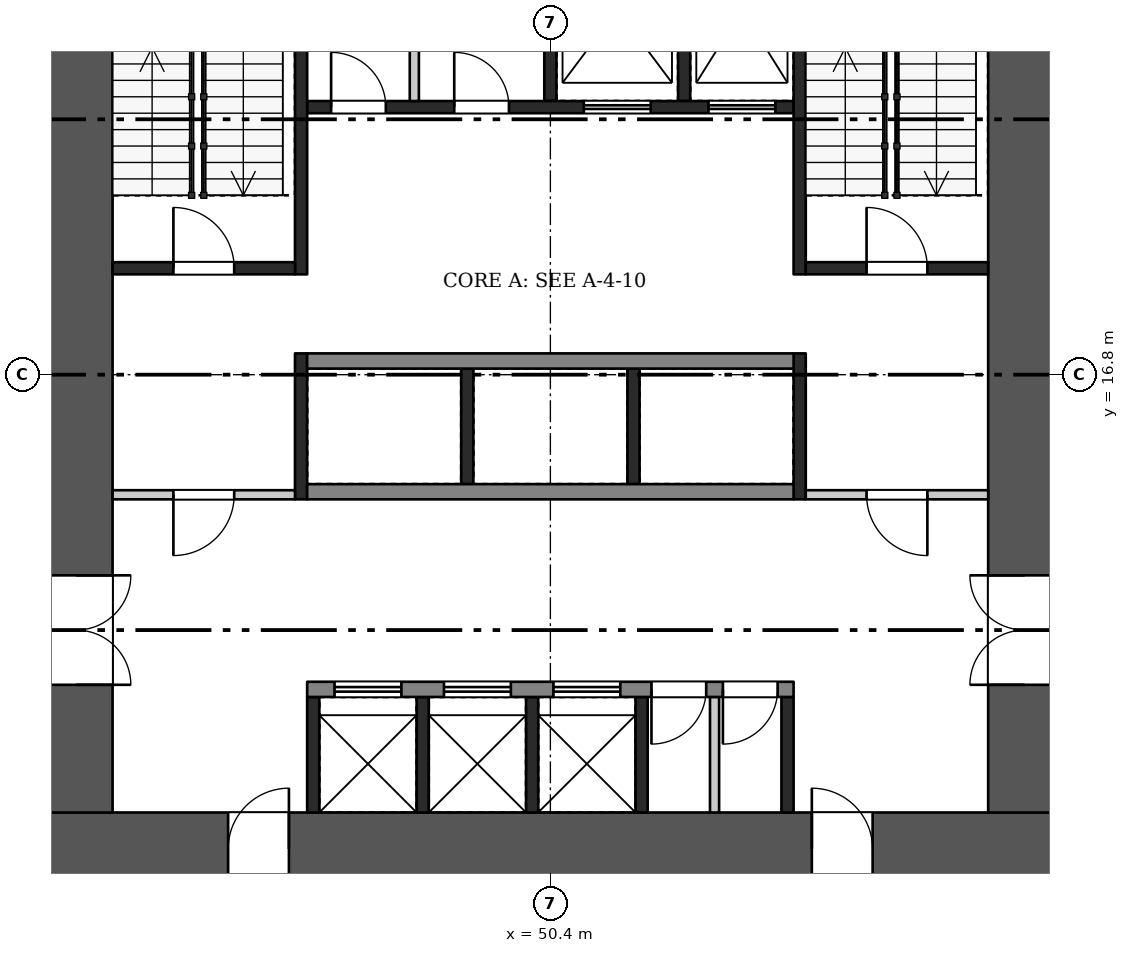
"""IFC4 building model, lengths in metres.
Left out: names, types, materials, properties, quantities, classifications, styles, units other than length and angle.
Written with IfcOpenShell. Run it as: python <this file> out.ifc"""

import sys

from ifc_helpers import new_model, si_unit, direction, frame, frame_2d, origin, place, context, subcontext, project, spatial, rectangle, extrude, element, fill, save


model = new_model("IFC4")
c1 = context("Model", 3, precision=1e-05, world=origin(), true_north=direction((0.0, 1.0)))
c2 = subcontext(c1, "Body", "Model", "MODEL_VIEW")
j1 = project(units=[si_unit("LENGTHUNIT", "METRE"), si_unit("PLANEANGLEUNIT", "RADIAN")], contexts=[c1])
p1 = place(None, origin())
s1 = spatial("IfcSite", under=j1, at=p1, CompositionType="ELEMENT")
p2 = place(p1, origin())
s2 = spatial("IfcBuilding", under=s1, at=p2, CompositionType="ELEMENT")
p3 = place(p2, frame((0.0, 0.0, 35.7)))
s3 = spatial("IfcBuildingStorey", under=s2, at=p3, CompositionType="ELEMENT", Elevation=35.7)
p4 = place(p3, frame((42.0, 9.0, 0.0), z_axis=(0.0, 0.0, 1.0), x_axis=(1.0, 0.0, 0.0)))
e1 = element("IfcWall", 1, at=p4, inside=s3, PredefinedType="SHEAR", context=c2, shape_type="SweptSolid", body=[
    extrude(rectangle(XDim=16.8, YDim=1.2, at=frame_2d((8.4, 0.0))), origin(), (0.0, 0.0, 1.0), 3.22),
])
p5 = place(p4, frame((3.1, 0.0, 0.0)))
e2 = element("IfcOpeningElement", 2, at=p5, cuts=e1, PredefinedType="OPENING", context=c2, shape_type="SweptSolid", body=[
    extrude(rectangle(XDim=1.0, YDim=2.1, at=frame_2d((0.5, 1.05))), frame((0.0, 0.61, 0.0), z_axis=(0.0, -1.0, 0.0), x_axis=(1.0, 0.0, 0.0)), (0.0, 0.0, 1.0), 1.22),
])
p6 = place(p4, frame((12.7, 0.0, 0.0)))
e3 = element("IfcOpeningElement", 3, at=p6, cuts=e1, PredefinedType="OPENING", context=c2, shape_type="SweptSolid", body=[
    extrude(rectangle(XDim=1.0, YDim=2.1, at=frame_2d((0.5, 1.05))), frame((0.0, 0.61, 0.0), z_axis=(0.0, -1.0, 0.0), x_axis=(1.0, 0.0, 0.0)), (0.0, 0.0, 1.0), 1.22),
])
p7 = place(p3, frame((42.6, 9.6, 0.0), z_axis=(0.0, 0.0, 1.0), x_axis=(0.0, 1.0, 0.0)))
e4 = element("IfcWall", 4, at=p7, inside=s3, PredefinedType="SHEAR", context=c2, shape_type="SweptSolid", body=[
    extrude(rectangle(XDim=14.4, YDim=1.2, at=frame_2d((7.2, 0.0))), origin(), (0.0, 0.0, 1.0), 3.22),
])
p8 = place(p7, frame((2.1, 0.0, 0.0)))
e5 = element("IfcOpeningElement", 5, at=p8, cuts=e4, PredefinedType="OPENING", context=c2, shape_type="SweptSolid", body=[
    extrude(rectangle(XDim=1.8, YDim=2.1, at=frame_2d((0.9, 1.05))), frame((0.0, 0.61, 0.0), z_axis=(0.0, -1.0, 0.0), x_axis=(1.0, 0.0, 0.0)), (0.0, 0.0, 1.0), 1.22),
])
p9 = place(p3, frame((58.2, 9.6, 0.0), z_axis=(0.0, 0.0, 1.0), x_axis=(0.0, 1.0, 0.0)))
e6 = element("IfcWall", 6, at=p9, inside=s3, PredefinedType="SHEAR", context=c2, shape_type="SweptSolid", body=[
    extrude(rectangle(XDim=14.4, YDim=1.2, at=frame_2d((7.2, 0.0))), origin(), (0.0, 0.0, 1.0), 3.22),
])
p10 = place(p9, frame((2.1, 0.0, 0.0)))
e7 = element("IfcOpeningElement", 7, at=p10, cuts=e6, PredefinedType="OPENING", context=c2, shape_type="SweptSolid", body=[
    extrude(rectangle(XDim=1.8, YDim=2.1, at=frame_2d((0.9, 1.05))), frame((0.0, 0.61, 0.0), z_axis=(0.0, -1.0, 0.0), x_axis=(1.0, 0.0, 0.0)), (0.0, 0.0, 1.0), 1.22),
])
for number, where, z_axis, x_axis in (
    (8, (46.5, 9.6, 0.0), (0.0, 0.0, 1.0), (0.0, 1.0, 0.0)),
    (9, (48.3, 9.6, 0.0), (0.0, 0.0, 1.0), (0.0, 1.0, 0.0)),
    (10, (50.1, 9.6, 0.0), (0.0, 0.0, 1.0), (0.0, 1.0, 0.0)),
    (11, (51.9, 9.6, 0.0), (0.0, 0.0, 1.0), (0.0, 1.0, 0.0)),
    (12, (54.3, 9.6, 0.0), (0.0, 0.0, 1.0), (0.0, 1.0, 0.0)),
):
    element("IfcWall", number, at=place(p3, frame(where, z_axis=z_axis, x_axis=x_axis)), inside=s3, PredefinedType="SHEAR", context=c2, shape_type="SweptSolid", body=[
        extrude(rectangle(XDim=1.9, YDim=0.2, at=frame_2d((0.95, 0.0))), origin(), (0.0, 0.0, 1.0), 3.22),
    ])
p11 = place(p3, frame((53.1, 9.6, 0.0), z_axis=(0.0, 0.0, 1.0), x_axis=(0.0, 1.0, 0.0)))
e13 = element("IfcWall", 13, at=p11, inside=s3, PredefinedType="PARTITIONING", context=c2, shape_type="SweptSolid", body=[
    extrude(rectangle(XDim=1.9, YDim=0.15, at=frame_2d((0.95, 0.0))), origin(), (0.0, 0.0, 1.0), 3.22),
])
p12 = place(p3, frame((46.4, 11.625, 0.0), z_axis=(0.0, 0.0, 1.0), x_axis=(1.0, 0.0, 0.0)))
e14 = element("IfcWall", 14, at=p12, inside=s3, PredefinedType="SHEAR", context=c2, shape_type="SweptSolid", body=[
    extrude(rectangle(XDim=8.0, YDim=0.25, at=frame_2d((4.0, 0.0))), origin(), (0.0, 0.0, 1.0), 3.22),
])
p13 = place(p12, frame((0.45, 0.0, 0.0)))
e15 = element("IfcOpeningElement", 15, at=p13, cuts=e14, PredefinedType="OPENING", context=c2, shape_type="SweptSolid", body=[
    extrude(rectangle(XDim=1.1, YDim=2.1, at=frame_2d((0.55, 1.05))), frame((0.0, 0.135, 0.0), z_axis=(0.0, -1.0, 0.0), x_axis=(1.0, 0.0, 0.0)), (0.0, 0.0, 1.0), 0.27),
])
p14 = place(p12, frame((2.25, 0.0, 0.0)))
e16 = element("IfcOpeningElement", 16, at=p14, cuts=e14, PredefinedType="OPENING", context=c2, shape_type="SweptSolid", body=[
    extrude(rectangle(XDim=1.1, YDim=2.1, at=frame_2d((0.55, 1.05))), frame((0.0, 0.135, 0.0), z_axis=(0.0, -1.0, 0.0), x_axis=(1.0, 0.0, 0.0)), (0.0, 0.0, 1.0), 0.27),
])
p15 = place(p12, frame((4.05, 0.0, 0.0)))
e17 = element("IfcOpeningElement", 17, at=p15, cuts=e14, PredefinedType="OPENING", context=c2, shape_type="SweptSolid", body=[
    extrude(rectangle(XDim=1.1, YDim=2.1, at=frame_2d((0.55, 1.05))), frame((0.0, 0.135, 0.0), z_axis=(0.0, -1.0, 0.0), x_axis=(1.0, 0.0, 0.0)), (0.0, 0.0, 1.0), 0.27),
])
p16 = place(p12, frame((5.663, 0.0, 0.0)))
e18 = element("IfcOpeningElement", 18, at=p16, cuts=e14, PredefinedType="OPENING", context=c2, shape_type="SweptSolid", body=[
    extrude(rectangle(XDim=0.9, YDim=2.1, at=frame_2d((0.45, 1.05))), frame((0.0, 0.135, 0.0), z_axis=(0.0, -1.0, 0.0), x_axis=(1.0, 0.0, 0.0)), (0.0, 0.0, 1.0), 0.27),
])
p17 = place(p12, frame((6.837, 0.0, 0.0)))
e19 = element("IfcOpeningElement", 19, at=p17, cuts=e14, PredefinedType="OPENING", context=c2, shape_type="SweptSolid", body=[
    extrude(rectangle(XDim=0.9, YDim=2.1, at=frame_2d((0.45, 1.05))), frame((0.0, 0.135, 0.0), z_axis=(0.0, -1.0, 0.0), x_axis=(1.0, 0.0, 0.0)), (0.0, 0.0, 1.0), 0.27),
])
for number, where, z_axis, x_axis in (
    (20, (49.033, 15.0, 0.0), (0.0, 0.0, 1.0), (0.0, 1.0, 0.0)),
    (21, (51.767, 15.0, 0.0), (0.0, 0.0, 1.0), (0.0, 1.0, 0.0)),
):
    element("IfcWall", number, at=place(p3, frame(where, z_axis=z_axis, x_axis=x_axis)), inside=s3, PredefinedType="SHEAR", context=c2, shape_type="SweptSolid", body=[
        extrude(rectangle(XDim=1.9, YDim=0.2, at=frame_2d((0.95, 0.0))), origin(), (0.0, 0.0, 1.0), 3.22),
    ])
for number, where, z_axis, x_axis in (
    (22, (46.4, 14.875, 0.0), (0.0, 0.0, 1.0), (1.0, 0.0, 0.0)),
    (23, (46.4, 17.025, 0.0), (0.0, 0.0, 1.0), (1.0, 0.0, 0.0)),
):
    element("IfcWall", number, at=place(p3, frame(where, z_axis=z_axis, x_axis=x_axis)), inside=s3, PredefinedType="SHEAR", context=c2, shape_type="SweptSolid", body=[
        extrude(rectangle(XDim=8.0, YDim=0.25, at=frame_2d((4.0, 0.0))), origin(), (0.0, 0.0, 1.0), 3.22),
    ])
for number, where, z_axis, x_axis in (
    (24, (50.4, 21.3, 0.0), (0.0, 0.0, 1.0), (0.0, 1.0, 0.0)),
    (25, (52.6, 21.3, 0.0), (0.0, 0.0, 1.0), (0.0, 1.0, 0.0)),
):
    element("IfcWall", number, at=place(p3, frame(where, z_axis=z_axis, x_axis=x_axis)), inside=s3, PredefinedType="SHEAR", context=c2, shape_type="SweptSolid", body=[
        extrude(rectangle(XDim=2.7, YDim=0.2, at=frame_2d((1.35, 0.0))), origin(), (0.0, 0.0, 1.0), 3.22),
    ])
p18 = place(p3, frame((48.163, 21.3, 0.0), z_axis=(0.0, 0.0, 1.0), x_axis=(0.0, 1.0, 0.0)))
e26 = element("IfcWall", 26, at=p18, inside=s3, PredefinedType="PARTITIONING", context=c2, shape_type="SweptSolid", body=[
    extrude(rectangle(XDim=2.7, YDim=0.15, at=frame_2d((1.35, 0.0))), origin(), (0.0, 0.0, 1.0), 3.22),
])
p19 = place(p3, frame((46.4, 21.2, 0.0), z_axis=(0.0, 0.0, 1.0), x_axis=(1.0, 0.0, 0.0)))
e27 = element("IfcWall", 27, at=p19, inside=s3, PredefinedType="SHEAR", context=c2, shape_type="SweptSolid", body=[
    extrude(rectangle(XDim=8.0, YDim=0.2, at=frame_2d((4.0, 0.0))), origin(), (0.0, 0.0, 1.0), 3.22),
])
p20 = place(p19, frame((0.394, 0.0, 0.0)))
e28 = element("IfcOpeningElement", 28, at=p20, cuts=e27, PredefinedType="OPENING", context=c2, shape_type="SweptSolid", body=[
    extrude(rectangle(XDim=0.9, YDim=2.1, at=frame_2d((0.45, 1.05))), frame((0.0, 0.11, 0.0), z_axis=(0.0, -1.0, 0.0), x_axis=(1.0, 0.0, 0.0)), (0.0, 0.0, 1.0), 0.22),
])
p21 = place(p19, frame((2.419, 0.0, 0.0)))
e29 = element("IfcOpeningElement", 29, at=p21, cuts=e27, PredefinedType="OPENING", context=c2, shape_type="SweptSolid", body=[
    extrude(rectangle(XDim=0.9, YDim=2.1, at=frame_2d((0.45, 1.05))), frame((0.0, 0.11, 0.0), z_axis=(0.0, -1.0, 0.0), x_axis=(1.0, 0.0, 0.0)), (0.0, 0.0, 1.0), 0.22),
])
p22 = place(p19, frame((4.55, 0.0, 0.0)))
e30 = element("IfcOpeningElement", 30, at=p22, cuts=e27, PredefinedType="OPENING", context=c2, shape_type="SweptSolid", body=[
    extrude(rectangle(XDim=1.1, YDim=2.1, at=frame_2d((0.55, 1.05))), frame((0.0, 0.11, 0.0), z_axis=(0.0, -1.0, 0.0), x_axis=(1.0, 0.0, 0.0)), (0.0, 0.0, 1.0), 0.22),
])
p23 = place(p19, frame((6.6, 0.0, 0.0)))
e31 = element("IfcOpeningElement", 31, at=p23, cuts=e27, PredefinedType="OPENING", context=c2, shape_type="SweptSolid", body=[
    extrude(rectangle(XDim=1.1, YDim=2.1, at=frame_2d((0.55, 1.05))), frame((0.0, 0.11, 0.0), z_axis=(0.0, -1.0, 0.0), x_axis=(1.0, 0.0, 0.0)), (0.0, 0.0, 1.0), 0.22),
])
p24 = place(p3, frame((46.3, 14.75, 0.0), z_axis=(0.0, 0.0, 1.0), x_axis=(0.0, 1.0, 0.0)))
e32 = element("IfcWall", 32, at=p24, inside=s3, PredefinedType="SHEAR", context=c2, shape_type="SweptSolid", body=[
    extrude(rectangle(XDim=2.4, YDim=0.2, at=frame_2d((1.2, 0.0))), origin(), (0.0, 0.0, 1.0), 3.22),
])
p25 = place(p3, frame((46.3, 18.45, 0.0), z_axis=(0.0, 0.0, 1.0), x_axis=(0.0, 1.0, 0.0)))
e33 = element("IfcWall", 33, at=p25, inside=s3, PredefinedType="SHEAR", context=c2, shape_type="SweptSolid", body=[
    extrude(rectangle(XDim=5.55, YDim=0.2, at=frame_2d((2.775, 0.0))), origin(), (0.0, 0.0, 1.0), 3.22),
])
p26 = place(p3, frame((43.2, 14.825, 0.0), z_axis=(0.0, 0.0, 1.0), x_axis=(1.0, 0.0, 0.0)))
e34 = element("IfcWall", 34, at=p26, inside=s3, PredefinedType="PARTITIONING", context=c2, shape_type="SweptSolid", body=[
    extrude(rectangle(XDim=3.0, YDim=0.15, at=frame_2d((1.5, 0.0))), origin(), (0.0, 0.0, 1.0), 3.22),
])
p27 = place(p26, frame((1.0, 0.0, 0.0)))
e35 = element("IfcOpeningElement", 35, at=p27, cuts=e34, PredefinedType="OPENING", context=c2, shape_type="SweptSolid", body=[
    extrude(rectangle(XDim=1.0, YDim=2.1, at=frame_2d((0.5, 1.05))), frame((0.0, 0.085, 0.0), z_axis=(0.0, -1.0, 0.0), x_axis=(1.0, 0.0, 0.0)), (0.0, 0.0, 1.0), 0.17),
])
p28 = place(p3, frame((43.2, 18.55, 0.0), z_axis=(0.0, 0.0, 1.0), x_axis=(1.0, 0.0, 0.0)))
e36 = element("IfcWall", 36, at=p28, inside=s3, PredefinedType="SHEAR", context=c2, shape_type="SweptSolid", body=[
    extrude(rectangle(XDim=3.0, YDim=0.2, at=frame_2d((1.5, 0.0))), origin(), (0.0, 0.0, 1.0), 3.22),
])
p29 = place(p28, frame((1.0, 0.0, 0.0)))
e37 = element("IfcOpeningElement", 37, at=p29, cuts=e36, PredefinedType="OPENING", context=c2, shape_type="SweptSolid", body=[
    extrude(rectangle(XDim=1.0, YDim=2.1, at=frame_2d((0.5, 1.05))), frame((0.0, 0.11, 0.0), z_axis=(0.0, -1.0, 0.0), x_axis=(1.0, 0.0, 0.0)), (0.0, 0.0, 1.0), 0.22),
])
p30 = place(p3, frame((54.5, 14.75, 0.0), z_axis=(0.0, 0.0, 1.0), x_axis=(0.0, 1.0, 0.0)))
e38 = element("IfcWall", 38, at=p30, inside=s3, PredefinedType="SHEAR", context=c2, shape_type="SweptSolid", body=[
    extrude(rectangle(XDim=2.4, YDim=0.2, at=frame_2d((1.2, 0.0))), origin(), (0.0, 0.0, 1.0), 3.22),
])
p31 = place(p3, frame((54.5, 18.45, 0.0), z_axis=(0.0, 0.0, 1.0), x_axis=(0.0, 1.0, 0.0)))
e39 = element("IfcWall", 39, at=p31, inside=s3, PredefinedType="SHEAR", context=c2, shape_type="SweptSolid", body=[
    extrude(rectangle(XDim=5.55, YDim=0.2, at=frame_2d((2.775, 0.0))), origin(), (0.0, 0.0, 1.0), 3.22),
])
p32 = place(p3, frame((54.6, 14.825, 0.0), z_axis=(0.0, 0.0, 1.0), x_axis=(1.0, 0.0, 0.0)))
e40 = element("IfcWall", 40, at=p32, inside=s3, PredefinedType="PARTITIONING", context=c2, shape_type="SweptSolid", body=[
    extrude(rectangle(XDim=3.0, YDim=0.15, at=frame_2d((1.5, 0.0))), origin(), (0.0, 0.0, 1.0), 3.22),
])
p33 = place(p32, frame((1.0, 0.0, 0.0)))
e41 = element("IfcOpeningElement", 41, at=p33, cuts=e40, PredefinedType="OPENING", context=c2, shape_type="SweptSolid", body=[
    extrude(rectangle(XDim=1.0, YDim=2.1, at=frame_2d((0.5, 1.05))), frame((0.0, 0.085, 0.0), z_axis=(0.0, -1.0, 0.0), x_axis=(1.0, 0.0, 0.0)), (0.0, 0.0, 1.0), 0.17),
])
p34 = place(p3, frame((54.6, 18.55, 0.0), z_axis=(0.0, 0.0, 1.0), x_axis=(1.0, 0.0, 0.0)))
e42 = element("IfcWall", 42, at=p34, inside=s3, PredefinedType="SHEAR", context=c2, shape_type="SweptSolid", body=[
    extrude(rectangle(XDim=3.0, YDim=0.2, at=frame_2d((1.5, 0.0))), origin(), (0.0, 0.0, 1.0), 3.22),
])
p35 = place(p34, frame((1.0, 0.0, 0.0)))
e43 = element("IfcOpeningElement", 43, at=p35, cuts=e42, PredefinedType="OPENING", context=c2, shape_type="SweptSolid", body=[
    extrude(rectangle(XDim=1.0, YDim=2.1, at=frame_2d((0.5, 1.05))), frame((0.0, 0.11, 0.0), z_axis=(0.0, -1.0, 0.0), x_axis=(1.0, 0.0, 0.0)), (0.0, 0.0, 1.0), 0.22),
])
p36 = place(p5, origin())
e44 = element("IfcDoor", 44, at=p36, inside=s3, OperationType="SINGLE_SWING_RIGHT", PredefinedType="DOOR", context=c2, shape_type="SweptSolid", body=[
    extrude(rectangle(XDim=1.0, YDim=2.1, at=frame_2d((0.5, 1.05))), frame((0.0, 0.025, 0.0), z_axis=(0.0, -1.0, 0.0), x_axis=(1.0, 0.0, 0.0)), (0.0, 0.0, 1.0), 0.05),
])
fill(e2, e44)
p37 = place(p6, origin())
e45 = element("IfcDoor", 45, at=p37, inside=s3, OperationType="SINGLE_SWING_LEFT", PredefinedType="DOOR", context=c2, shape_type="SweptSolid", body=[
    extrude(rectangle(XDim=1.0, YDim=2.1, at=frame_2d((0.5, 1.05))), frame((0.0, 0.025, 0.0), z_axis=(0.0, -1.0, 0.0), x_axis=(1.0, 0.0, 0.0)), (0.0, 0.0, 1.0), 0.05),
])
fill(e3, e45)
p38 = place(p8, frame((1.8, 0.0, 0.0), z_axis=(0.0, 0.0, 1.0), x_axis=(-1.0, 0.0, 0.0)))
e46 = element("IfcDoor", 46, at=p38, inside=s3, OperationType="DOUBLE_DOOR_SINGLE_SWING", PredefinedType="DOOR", context=c2, shape_type="SweptSolid", body=[
    extrude(rectangle(XDim=1.8, YDim=2.1, at=frame_2d((0.9, 1.05))), frame((0.0, 0.025, 0.0), z_axis=(0.0, -1.0, 0.0), x_axis=(1.0, 0.0, 0.0)), (0.0, 0.0, 1.0), 0.05),
])
fill(e5, e46)
p39 = place(p10, origin())
e47 = element("IfcDoor", 47, at=p39, inside=s3, OperationType="DOUBLE_DOOR_SINGLE_SWING", PredefinedType="DOOR", context=c2, shape_type="SweptSolid", body=[
    extrude(rectangle(XDim=1.8, YDim=2.1, at=frame_2d((0.9, 1.05))), frame((0.0, 0.025, 0.0), z_axis=(0.0, -1.0, 0.0), x_axis=(1.0, 0.0, 0.0)), (0.0, 0.0, 1.0), 0.05),
])
fill(e7, e47)
p40 = place(p13, origin())
e48 = element("IfcDoor", 48, at=p40, inside=s3, OperationType="DOUBLE_DOOR_SLIDING", PredefinedType="DOOR", context=c2, shape_type="SweptSolid", body=[
    extrude(rectangle(XDim=1.1, YDim=2.1, at=frame_2d((0.55, 1.05))), frame((0.0, 0.025, 0.0), z_axis=(0.0, -1.0, 0.0), x_axis=(1.0, 0.0, 0.0)), (0.0, 0.0, 1.0), 0.05),
])
fill(e15, e48)
p41 = place(p14, origin())
e49 = element("IfcDoor", 49, at=p41, inside=s3, OperationType="DOUBLE_DOOR_SLIDING", PredefinedType="DOOR", context=c2, shape_type="SweptSolid", body=[
    extrude(rectangle(XDim=1.1, YDim=2.1, at=frame_2d((0.55, 1.05))), frame((0.0, 0.025, 0.0), z_axis=(0.0, -1.0, 0.0), x_axis=(1.0, 0.0, 0.0)), (0.0, 0.0, 1.0), 0.05),
])
fill(e16, e49)
p42 = place(p15, origin())
e50 = element("IfcDoor", 50, at=p42, inside=s3, OperationType="DOUBLE_DOOR_SLIDING", PredefinedType="DOOR", context=c2, shape_type="SweptSolid", body=[
    extrude(rectangle(XDim=1.1, YDim=2.1, at=frame_2d((0.55, 1.05))), frame((0.0, 0.025, 0.0), z_axis=(0.0, -1.0, 0.0), x_axis=(1.0, 0.0, 0.0)), (0.0, 0.0, 1.0), 0.05),
])
fill(e17, e50)
p43 = place(p16, frame((0.9, 0.0, 0.0), z_axis=(0.0, 0.0, 1.0), x_axis=(-1.0, 0.0, 0.0)))
e51 = element("IfcDoor", 51, at=p43, inside=s3, OperationType="SINGLE_SWING_RIGHT", PredefinedType="DOOR", context=c2, shape_type="SweptSolid", body=[
    extrude(rectangle(XDim=0.9, YDim=2.1, at=frame_2d((0.45, 1.05))), frame((0.0, 0.025, 0.0), z_axis=(0.0, -1.0, 0.0), x_axis=(1.0, 0.0, 0.0)), (0.0, 0.0, 1.0), 0.05),
])
fill(e18, e51)
p44 = place(p17, frame((0.9, 0.0, 0.0), z_axis=(0.0, 0.0, 1.0), x_axis=(-1.0, 0.0, 0.0)))
e52 = element("IfcDoor", 52, at=p44, inside=s3, OperationType="SINGLE_SWING_RIGHT", PredefinedType="DOOR", context=c2, shape_type="SweptSolid", body=[
    extrude(rectangle(XDim=0.9, YDim=2.1, at=frame_2d((0.45, 1.05))), frame((0.0, 0.025, 0.0), z_axis=(0.0, -1.0, 0.0), x_axis=(1.0, 0.0, 0.0)), (0.0, 0.0, 1.0), 0.05),
])
fill(e19, e52)
p45 = place(p20, origin())
e53 = element("IfcDoor", 53, at=p45, inside=s3, OperationType="SINGLE_SWING_LEFT", PredefinedType="DOOR", context=c2, shape_type="SweptSolid", body=[
    extrude(rectangle(XDim=0.9, YDim=2.1, at=frame_2d((0.45, 1.05))), frame((0.0, 0.025, 0.0), z_axis=(0.0, -1.0, 0.0), x_axis=(1.0, 0.0, 0.0)), (0.0, 0.0, 1.0), 0.05),
])
fill(e28, e53)
p46 = place(p21, origin())
e54 = element("IfcDoor", 54, at=p46, inside=s3, OperationType="SINGLE_SWING_LEFT", PredefinedType="DOOR", context=c2, shape_type="SweptSolid", body=[
    extrude(rectangle(XDim=0.9, YDim=2.1, at=frame_2d((0.45, 1.05))), frame((0.0, 0.025, 0.0), z_axis=(0.0, -1.0, 0.0), x_axis=(1.0, 0.0, 0.0)), (0.0, 0.0, 1.0), 0.05),
])
fill(e29, e54)
p47 = place(p22, origin())
e55 = element("IfcDoor", 55, at=p47, inside=s3, OperationType="DOUBLE_DOOR_SLIDING", PredefinedType="DOOR", context=c2, shape_type="SweptSolid", body=[
    extrude(rectangle(XDim=1.1, YDim=2.1, at=frame_2d((0.55, 1.05))), frame((0.0, 0.025, 0.0), z_axis=(0.0, -1.0, 0.0), x_axis=(1.0, 0.0, 0.0)), (0.0, 0.0, 1.0), 0.05),
])
fill(e30, e55)
p48 = place(p23, origin())
e56 = element("IfcDoor", 56, at=p48, inside=s3, OperationType="DOUBLE_DOOR_SLIDING", PredefinedType="DOOR", context=c2, shape_type="SweptSolid", body=[
    extrude(rectangle(XDim=1.1, YDim=2.1, at=frame_2d((0.55, 1.05))), frame((0.0, 0.025, 0.0), z_axis=(0.0, -1.0, 0.0), x_axis=(1.0, 0.0, 0.0)), (0.0, 0.0, 1.0), 0.05),
])
fill(e31, e56)
p49 = place(p27, frame((1.0, 0.0, 0.0), z_axis=(0.0, 0.0, 1.0), x_axis=(-1.0, 0.0, 0.0)))
e57 = element("IfcDoor", 57, at=p49, inside=s3, OperationType="SINGLE_SWING_RIGHT", PredefinedType="DOOR", context=c2, shape_type="SweptSolid", body=[
    extrude(rectangle(XDim=1.0, YDim=2.1, at=frame_2d((0.5, 1.05))), frame((0.0, 0.025, 0.0), z_axis=(0.0, -1.0, 0.0), x_axis=(1.0, 0.0, 0.0)), (0.0, 0.0, 1.0), 0.05),
])
fill(e35, e57)
p50 = place(p29, origin())
e58 = element("IfcDoor", 58, at=p50, inside=s3, OperationType="SINGLE_SWING_LEFT", PredefinedType="DOOR", context=c2, shape_type="SweptSolid", body=[
    extrude(rectangle(XDim=1.0, YDim=2.1, at=frame_2d((0.5, 1.05))), frame((0.0, 0.025, 0.0), z_axis=(0.0, -1.0, 0.0), x_axis=(1.0, 0.0, 0.0)), (0.0, 0.0, 1.0), 0.05),
])
fill(e37, e58)
p51 = place(p33, frame((1.0, 0.0, 0.0), z_axis=(0.0, 0.0, 1.0), x_axis=(-1.0, 0.0, 0.0)))
e59 = element("IfcDoor", 59, at=p51, inside=s3, OperationType="SINGLE_SWING_LEFT", PredefinedType="DOOR", context=c2, shape_type="SweptSolid", body=[
    extrude(rectangle(XDim=1.0, YDim=2.1, at=frame_2d((0.5, 1.05))), frame((0.0, 0.025, 0.0), z_axis=(0.0, -1.0, 0.0), x_axis=(1.0, 0.0, 0.0)), (0.0, 0.0, 1.0), 0.05),
])
fill(e41, e59)
p52 = place(p35, origin())
e60 = element("IfcDoor", 60, at=p52, inside=s3, OperationType="SINGLE_SWING_LEFT", PredefinedType="DOOR", context=c2, shape_type="SweptSolid", body=[
    extrude(rectangle(XDim=1.0, YDim=2.1, at=frame_2d((0.5, 1.05))), frame((0.0, 0.025, 0.0), z_axis=(0.0, -1.0, 0.0), x_axis=(1.0, 0.0, 0.0)), (0.0, 0.0, 1.0), 0.05),
])
fill(e43, e60)
save(model, sys.argv[1])
